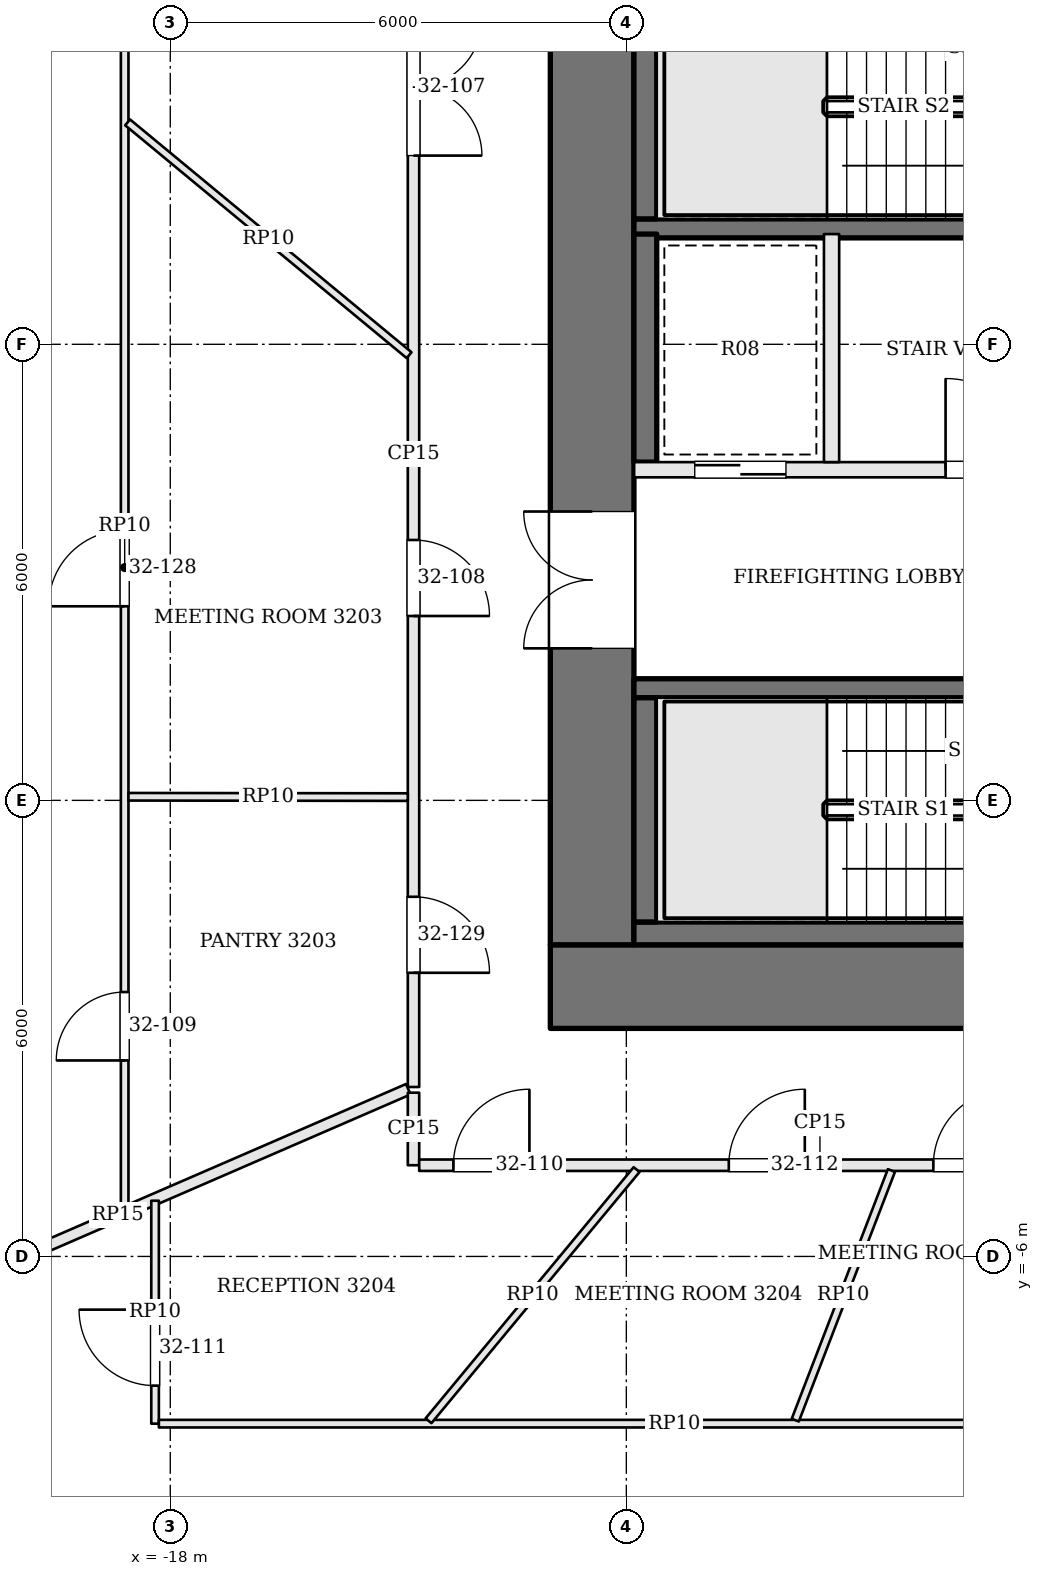
"""IFC4 building model, lengths in metres.
Left out: names, types, materials, properties, quantities, classifications, styles, units other than length and angle.
Written with IfcOpenShell. Run it as: python <this file> out.ifc"""

import sys

from ifc_helpers import new_model, si_unit, direction, frame, frame_2d, origin, place, context, subcontext, project, spatial, rectangle, extrude, element, fill, save


model = new_model("IFC4")
c1 = context("Model", 3, precision=1e-05, world=origin(), true_north=direction((0.0, 1.0)))
c2 = subcontext(c1, "Body", "Model", "MODEL_VIEW")
j1 = project(units=[si_unit("LENGTHUNIT", "METRE"), si_unit("PLANEANGLEUNIT", "RADIAN")], contexts=[c1])
p1 = place(None, origin())
s1 = spatial("IfcSite", under=j1, at=p1, CompositionType="ELEMENT")
p2 = place(p1, origin())
s2 = spatial("IfcBuilding", under=s1, at=p2, CompositionType="ELEMENT")
p3 = place(p2, frame((0.0, 0.0, 134.4)))
s3 = spatial("IfcBuildingStorey", under=s2, at=p3, CompositionType="ELEMENT", Elevation=134.4)
p4 = place(p3, frame((-13.0, -2.45, 0.0), z_axis=(0.0, 0.0, 1.0), x_axis=(1.0, 0.0, 0.0)))
e1 = element("IfcWall", 1, at=p4, inside=s3, PredefinedType="SHEAR", context=c2, shape_type="SweptSolid", body=[
    extrude(rectangle(XDim=26.0, YDim=1.1, at=frame_2d((13.0, 0.0))), origin(), (0.0, 0.0, 1.0), 3.9),
])
p5 = place(p4, frame((9.275, 0.0, 0.0)))
e2 = element("IfcOpeningElement", 2, at=p5, cuts=e1, PredefinedType="OPENING", context=c2, shape_type="SweptSolid", body=[
    extrude(rectangle(XDim=0.9, YDim=2.1, at=frame_2d((0.45, 1.05))), frame((0.0, 0.56, 0.0), z_axis=(0.0, -1.0, 0.0), x_axis=(1.0, 0.0, 0.0)), (0.0, 0.0, 1.0), 1.12),
])
p6 = place(p4, frame((11.75, 0.0, 0.0)))
e3 = element("IfcOpeningElement", 3, at=p6, cuts=e1, PredefinedType="OPENING", context=c2, shape_type="SweptSolid", body=[
    extrude(rectangle(XDim=1.0, YDim=2.1, at=frame_2d((0.5, 1.05))), frame((0.0, 0.56, 0.0), z_axis=(0.0, -1.0, 0.0), x_axis=(1.0, 0.0, 0.0)), (0.0, 0.0, 1.0), 1.12),
])
p7 = place(p4, frame((14.325, 0.0, 0.0)))
e4 = element("IfcOpeningElement", 4, at=p7, cuts=e1, PredefinedType="OPENING", context=c2, shape_type="SweptSolid", body=[
    extrude(rectangle(XDim=0.9, YDim=2.1, at=frame_2d((0.45, 1.05))), frame((0.0, 0.56, 0.0), z_axis=(0.0, -1.0, 0.0), x_axis=(1.0, 0.0, 0.0)), (0.0, 0.0, 1.0), 1.12),
])
p8 = place(p4, frame((16.7, 0.0, 0.0)))
e5 = element("IfcOpeningElement", 5, at=p8, cuts=e1, PredefinedType="OPENING", context=c2, shape_type="SweptSolid", body=[
    extrude(rectangle(XDim=0.9, YDim=2.1, at=frame_2d((0.45, 1.05))), frame((0.0, 0.56, 0.0), z_axis=(0.0, -1.0, 0.0), x_axis=(1.0, 0.0, 0.0)), (0.0, 0.0, 1.0), 1.12),
])
p9 = place(p3, frame((-12.45, -1.9, 0.0), z_axis=(0.0, 0.0, 1.0), x_axis=(0.0, 1.0, 0.0)))
e6 = element("IfcWall", 6, at=p9, inside=s3, PredefinedType="SHEAR", context=c2, shape_type="SweptSolid", body=[
    extrude(rectangle(XDim=12.8, YDim=1.1, at=frame_2d((6.4, 0.0))), origin(), (0.0, 0.0, 1.0), 3.9),
])
p10 = place(p9, frame((3.9, 0.0, 0.0)))
e7 = element("IfcOpeningElement", 7, at=p10, cuts=e6, PredefinedType="OPENING", context=c2, shape_type="SweptSolid", body=[
    extrude(rectangle(XDim=1.8, YDim=2.1, at=frame_2d((0.9, 1.05))), frame((0.0, 0.56, 0.0), z_axis=(0.0, -1.0, 0.0), x_axis=(1.0, 0.0, 0.0)), (0.0, 0.0, 1.0), 1.12),
])
p11 = place(p3, frame((-11.9, 1.475, 0.0), z_axis=(0.0, 0.0, 1.0), x_axis=(1.0, 0.0, 0.0)))
e8 = element("IfcWall", 8, at=p11, inside=s3, PredefinedType="SOLIDWALL", context=c2, shape_type="SweptSolid", body=[
    extrude(rectangle(XDim=6.8, YDim=0.25, at=frame_2d((3.4, 0.0))), origin(), (0.0, 0.0, 1.0), 3.7),
])
p12 = place(p11, frame((5.5, 0.0, 0.0)))
e9 = element("IfcOpeningElement", 9, at=p12, cuts=e8, PredefinedType="OPENING", context=c2, shape_type="SweptSolid", body=[
    extrude(rectangle(XDim=1.2, YDim=2.1, at=frame_2d((0.6, 1.05))), frame((0.0, 0.135, 0.0), z_axis=(0.0, -1.0, 0.0), x_axis=(1.0, 0.0, 0.0)), (0.0, 0.0, 1.0), 0.27),
])
p13 = place(p3, frame((-11.9, 4.35, 0.0), z_axis=(0.0, 0.0, 1.0), x_axis=(1.0, 0.0, 0.0)))
e10 = element("IfcWall", 10, at=p13, inside=s3, PredefinedType="SOLIDWALL", context=c2, shape_type="SweptSolid", body=[
    extrude(rectangle(XDim=6.8, YDim=0.2, at=frame_2d((3.4, 0.0))), origin(), (0.0, 0.0, 1.0), 3.7),
])
p14 = place(p13, frame((4.1, 0.0, 0.0)))
e11 = element("IfcOpeningElement", 11, at=p14, cuts=e10, PredefinedType="OPENING", context=c2, shape_type="SweptSolid", body=[
    extrude(rectangle(XDim=1.2, YDim=2.1, at=frame_2d((0.6, 1.05))), frame((0.0, 0.11, 0.0), z_axis=(0.0, -1.0, 0.0), x_axis=(1.0, 0.0, 0.0)), (0.0, 0.0, 1.0), 0.22),
])
p15 = place(p13, frame((0.8, 0.0, 0.0)))
e12 = element("IfcOpeningElement", 12, at=p15, cuts=e10, PredefinedType="OPENING", context=c2, shape_type="SweptSolid", body=[
    extrude(rectangle(XDim=1.2, YDim=2.1, at=frame_2d((0.6, 1.05))), frame((0.0, 0.11, 0.0), z_axis=(0.0, -1.0, 0.0), x_axis=(1.0, 0.0, 0.0)), (0.0, 0.0, 1.0), 0.22),
])
p16 = place(p3, frame((-11.9, 7.525, 0.0), z_axis=(0.0, 0.0, 1.0), x_axis=(1.0, 0.0, 0.0)))
e13 = element("IfcWall", 13, at=p16, inside=s3, PredefinedType="SOLIDWALL", context=c2, shape_type="SweptSolid", body=[
    extrude(rectangle(XDim=6.8, YDim=0.25, at=frame_2d((3.4, 0.0))), origin(), (0.0, 0.0, 1.0), 3.7),
])
p17 = place(p16, frame((5.5, 0.0, 0.0)))
e14 = element("IfcOpeningElement", 14, at=p17, cuts=e13, PredefinedType="OPENING", context=c2, shape_type="SweptSolid", body=[
    extrude(rectangle(XDim=1.2, YDim=2.1, at=frame_2d((0.6, 1.05))), frame((0.0, 0.135, 0.0), z_axis=(0.0, -1.0, 0.0), x_axis=(1.0, 0.0, 0.0)), (0.0, 0.0, 1.0), 0.27),
])
p18 = place(p3, frame((-9.3, 4.45, 0.0), z_axis=(0.0, 0.0, 1.0), x_axis=(0.0, 1.0, 0.0)))
e15 = element("IfcWall", 15, at=p18, inside=s3, PredefinedType="SOLIDWALL", context=c2, shape_type="SweptSolid", body=[
    extrude(rectangle(XDim=3.0, YDim=0.2, at=frame_2d((1.5, 0.0))), origin(), (0.0, 0.0, 1.0), 3.7),
])
p19 = place(p3, frame((-11.9, -1.75, 0.0), z_axis=(0.0, 0.0, 1.0), x_axis=(1.0, 0.0, 0.0)))
e16 = element("IfcWall", 16, at=p19, inside=s3, PredefinedType="SOLIDWALL", context=c2, shape_type="SweptSolid", body=[
    extrude(rectangle(XDim=6.8, YDim=0.3, at=frame_2d((3.4, 0.0))), origin(), (0.0, 0.0, 1.0), 3.7),
])
p20 = place(p3, frame((-11.75, -1.6, 0.0), z_axis=(0.0, 0.0, 1.0), x_axis=(0.0, 1.0, 0.0)))
e17 = element("IfcWall", 17, at=p20, inside=s3, PredefinedType="SOLIDWALL", context=c2, shape_type="SweptSolid", body=[
    extrude(rectangle(XDim=2.95, YDim=0.3, at=frame_2d((1.475, 0.0))), origin(), (0.0, 0.0, 1.0), 3.7),
])
p21 = place(p3, frame((-11.75, 4.45, 0.0), z_axis=(0.0, 0.0, 1.0), x_axis=(0.0, 1.0, 0.0)))
e18 = element("IfcWall", 18, at=p21, inside=s3, PredefinedType="SOLIDWALL", context=c2, shape_type="SweptSolid", body=[
    extrude(rectangle(XDim=3.0, YDim=0.3, at=frame_2d((1.5, 0.0))), origin(), (0.0, 0.0, 1.0), 3.7),
])
p22 = place(p3, frame((-11.75, 7.65, 0.0), z_axis=(0.0, 0.0, 1.0), x_axis=(0.0, 1.0, 0.0)))
e19 = element("IfcWall", 19, at=p22, inside=s3, PredefinedType="SOLIDWALL", context=c2, shape_type="SweptSolid", body=[
    extrude(rectangle(XDim=2.95, YDim=0.3, at=frame_2d((1.475, 0.0))), origin(), (0.0, 0.0, 1.0), 3.7),
])
p23 = place(p3, frame((-14.8, 12.882, 0.0), z_axis=(0.0, 0.0, 1.0), x_axis=(0.0, -1.0, 0.0)))
e20 = element("IfcWall", 20, at=p23, inside=s3, PredefinedType="PARTITIONING", context=c2, shape_type="SweptSolid", body=[
    extrude(rectangle(XDim=16.652, YDim=0.15, at=frame_2d((8.326, 0.0))), origin(), (0.0, 0.0, 1.0), 3.198),
])
p24 = place(p23, frame((2.599, 0.0, 0.0)))
e21 = element("IfcOpeningElement", 21, at=p24, cuts=e20, PredefinedType="OPENING", context=c2, shape_type="SweptSolid", body=[
    extrude(rectangle(XDim=1.8, YDim=2.1, at=frame_2d((0.9, 1.05))), frame((0.0, 0.085, 0.0), z_axis=(0.0, -1.0, 0.0), x_axis=(1.0, 0.0, 0.0)), (0.0, 0.0, 1.0), 0.17),
])
p25 = place(p23, frame((9.456, 0.0, 0.0)))
e22 = element("IfcOpeningElement", 22, at=p25, cuts=e20, PredefinedType="OPENING", context=c2, shape_type="SweptSolid", body=[
    extrude(rectangle(XDim=1.0, YDim=2.4, at=frame_2d((0.5, 1.2))), frame((0.0, 0.085, 0.0), z_axis=(0.0, -1.0, 0.0), x_axis=(1.0, 0.0, 0.0)), (0.0, 0.0, 1.0), 0.17),
])
p26 = place(p23, frame((14.15, 0.0, 0.0)))
e23 = element("IfcOpeningElement", 23, at=p26, cuts=e20, PredefinedType="OPENING", context=c2, shape_type="SweptSolid", body=[
    extrude(rectangle(XDim=1.0, YDim=2.1, at=frame_2d((0.5, 1.05))), frame((0.0, 0.085, 0.0), z_axis=(0.0, -1.0, 0.0), x_axis=(1.0, 0.0, 0.0)), (0.0, 0.0, 1.0), 0.17),
])
p27 = place(p3, frame((-22.514, -7.116, 0.0), z_axis=(0.0, 0.0, 1.0), x_axis=(0.917457618692, 0.397833530392, 0.0)))
e24 = element("IfcWall", 24, at=p27, inside=s3, PredefinedType="PARTITIONING", context=c2, shape_type="SweptSolid", body=[
    extrude(rectangle(XDim=8.333, YDim=0.15, at=frame_2d((4.167, 0.0))), origin(), (0.0, 0.0, 1.0), 3.198),
])
p28 = place(p3, frame((-14.8, -3.846, 0.0), z_axis=(0.0, 0.0, 1.0), x_axis=(0.0, -1.0, 0.0)))
e25 = element("IfcWall", 25, at=p28, inside=s3, PredefinedType="PARTITIONING", context=c2, shape_type="SweptSolid", body=[
    extrude(rectangle(XDim=0.954, YDim=0.15, at=frame_2d((0.477, 0.0))), origin(), (0.0, 0.0, 1.0), 3.198),
])
p29 = place(p3, frame((-14.725, -4.8, 0.0), z_axis=(0.0, 0.0, 1.0), x_axis=(1.0, 0.0, 0.0)))
e26 = element("IfcWall", 26, at=p29, inside=s3, PredefinedType="PARTITIONING", context=c2, shape_type="SweptSolid", body=[
    extrude(rectangle(XDim=10.544, YDim=0.15, at=frame_2d((5.272, 0.0))), origin(), (0.0, 0.0, 1.0), 3.198),
])
p30 = place(p29, frame((0.45, 0.0, 0.0)))
e27 = element("IfcOpeningElement", 27, at=p30, cuts=e26, PredefinedType="OPENING", context=c2, shape_type="SweptSolid", body=[
    extrude(rectangle(XDim=1.0, YDim=2.1, at=frame_2d((0.5, 1.05))), frame((0.0, 0.085, 0.0), z_axis=(0.0, -1.0, 0.0), x_axis=(1.0, 0.0, 0.0)), (0.0, 0.0, 1.0), 0.17),
])
p31 = place(p29, frame((4.073, 0.0, 0.0)))
e28 = element("IfcOpeningElement", 28, at=p31, cuts=e26, PredefinedType="OPENING", context=c2, shape_type="SweptSolid", body=[
    extrude(rectangle(XDim=1.0, YDim=2.4, at=frame_2d((0.5, 1.2))), frame((0.0, 0.085, 0.0), z_axis=(0.0, -1.0, 0.0), x_axis=(1.0, 0.0, 0.0)), (0.0, 0.0, 1.0), 0.17),
])
p32 = place(p29, frame((6.764, 0.0, 0.0)))
e29 = element("IfcOpeningElement", 29, at=p32, cuts=e26, PredefinedType="OPENING", context=c2, shape_type="SweptSolid", body=[
    extrude(rectangle(XDim=1.0, YDim=2.4, at=frame_2d((0.5, 1.2))), frame((0.0, 0.085, 0.0), z_axis=(0.0, -1.0, 0.0), x_axis=(1.0, 0.0, 0.0)), (0.0, 0.0, 1.0), 0.17),
])
p33 = place(p29, frame((8.916, 0.0, 0.0)))
e30 = element("IfcOpeningElement", 30, at=p33, cuts=e26, PredefinedType="OPENING", context=c2, shape_type="SweptSolid", body=[
    extrude(rectangle(XDim=1.0, YDim=2.4, at=frame_2d((0.5, 1.2))), frame((0.0, 0.085, 0.0), z_axis=(0.0, -1.0, 0.0), x_axis=(1.0, 0.0, 0.0)), (0.0, 0.0, 1.0), 0.17),
])
p34 = place(p3, frame((-18.6, -5.397, 0.0), z_axis=(0.0, 0.0, 1.0), x_axis=(0.0, 1.0, 0.0)))
e31 = element("IfcWall", 31, at=p34, inside=s3, PredefinedType="PARTITIONING", context=c2, shape_type="SweptSolid", body=[
    extrude(rectangle(XDim=16.919, YDim=0.1, at=frame_2d((8.459, 0.0))), origin(), (0.0, 0.0, 1.0), 3.184),
])
p35 = place(p34, frame((1.975, 0.0, 0.0)))
e32 = element("IfcOpeningElement", 32, at=p35, cuts=e31, PredefinedType="OPENING", context=c2, shape_type="SweptSolid", body=[
    extrude(rectangle(XDim=0.9, YDim=2.1, at=frame_2d((0.45, 1.05))), frame((0.0, 0.06, 0.0), z_axis=(0.0, -1.0, 0.0), x_axis=(1.0, 0.0, 0.0)), (0.0, 0.0, 1.0), 0.12),
])
p36 = place(p34, frame((7.95, 0.0, 0.0)))
e33 = element("IfcOpeningElement", 33, at=p36, cuts=e31, PredefinedType="OPENING", context=c2, shape_type="SweptSolid", body=[
    extrude(rectangle(XDim=1.0, YDim=2.4, at=frame_2d((0.5, 1.2))), frame((0.0, 0.06, 0.0), z_axis=(0.0, -1.0, 0.0), x_axis=(1.0, 0.0, 0.0)), (0.0, 0.0, 1.0), 0.12),
])
p37 = place(p3, frame((-14.858, 5.857, 0.0), z_axis=(0.0, 0.0, 1.0), x_axis=(-0.770605931108, 0.637311932213, 0.0)))
e34 = element("IfcWall", 34, at=p37, inside=s3, PredefinedType="PARTITIONING", context=c2, shape_type="SweptSolid", body=[
    extrude(rectangle(XDim=4.806, YDim=0.1, at=frame_2d((2.403, 0.0))), origin(), (0.0, 0.0, 1.0), 3.184),
])
p38 = place(p3, frame((-14.875, 0.043, 0.0), z_axis=(0.0, 0.0, 1.0), x_axis=(-0.999999285062, 0.001195774074, 0.0)))
e35 = element("IfcWall", 35, at=p38, inside=s3, PredefinedType="PARTITIONING", context=c2, shape_type="SweptSolid", body=[
    extrude(rectangle(XDim=3.675, YDim=0.1, at=frame_2d((1.837, 0.0))), origin(), (0.0, 0.0, 1.0), 3.184),
])
p39 = place(p3, frame((-18.2, -8.2, 0.0), z_axis=(0.0, 0.0, 1.0), x_axis=(0.0, 1.0, 0.0)))
e36 = element("IfcWall", 36, at=p39, inside=s3, PredefinedType="PARTITIONING", context=c2, shape_type="SweptSolid", body=[
    extrude(rectangle(XDim=2.933, YDim=0.1, at=frame_2d((1.467, 0.0))), origin(), (0.0, 0.0, 1.0), 3.184),
])
p40 = place(p39, frame((0.5, 0.0, 0.0)))
e37 = element("IfcOpeningElement", 37, at=p40, cuts=e36, PredefinedType="OPENING", context=c2, shape_type="SweptSolid", body=[
    extrude(rectangle(XDim=1.0, YDim=2.1, at=frame_2d((0.5, 1.05))), frame((0.0, 0.06, 0.0), z_axis=(0.0, -1.0, 0.0), x_axis=(1.0, 0.0, 0.0)), (0.0, 0.0, 1.0), 0.12),
])
p41 = place(p3, frame((-4.584, -8.2, 0.0), z_axis=(0.0, 0.0, 1.0), x_axis=(-1.0, 0.0, 0.0)))
e38 = element("IfcWall", 38, at=p41, inside=s3, PredefinedType="PARTITIONING", context=c2, shape_type="SweptSolid", body=[
    extrude(rectangle(XDim=13.566, YDim=0.1, at=frame_2d((6.783, 0.0))), origin(), (0.0, 0.0, 1.0), 3.184),
])
p42 = place(p3, frame((-11.865, -4.858, 0.0), z_axis=(0.0, 0.0, 1.0), x_axis=(-0.638010152626, -0.770027950886, 0.0)))
e39 = element("IfcWall", 39, at=p42, inside=s3, PredefinedType="PARTITIONING", context=c2, shape_type="SweptSolid", body=[
    extrude(rectangle(XDim=4.29, YDim=0.1, at=frame_2d((2.145, 0.0))), origin(), (0.0, 0.0, 1.0), 3.184),
])
p43 = place(p3, frame((-8.513, -4.87, 0.0), z_axis=(0.0, 0.0, 1.0), x_axis=(-0.359444024243, -0.933166648266, 0.0)))
e40 = element("IfcWall", 40, at=p43, inside=s3, PredefinedType="PARTITIONING", context=c2, shape_type="SweptSolid", body=[
    extrude(rectangle(XDim=3.518, YDim=0.1, at=frame_2d((1.759, 0.0))), origin(), (0.0, 0.0, 1.0), 3.184),
])
p44 = place(p10, origin())
e41 = element("IfcDoor", 41, at=p44, inside=s3, OperationType="DOUBLE_DOOR_SINGLE_SWING", PredefinedType="DOOR", context=c2, shape_type="SweptSolid", body=[
    extrude(rectangle(XDim=1.8, YDim=2.1, at=frame_2d((0.9, 1.05))), frame((0.0, 0.025, 0.0), z_axis=(0.0, -1.0, 0.0), x_axis=(1.0, 0.0, 0.0)), (0.0, 0.0, 1.0), 0.05),
])
fill(e7, e41)
p45 = place(p14, origin())
e42 = element("IfcDoor", 42, at=p45, inside=s3, OperationType="SINGLE_SWING_LEFT", PredefinedType="DOOR", context=c2, shape_type="SweptSolid", body=[
    extrude(rectangle(XDim=1.2, YDim=2.1, at=frame_2d((0.6, 1.05))), frame((0.0, 0.025, 0.0), z_axis=(0.0, -1.0, 0.0), x_axis=(1.0, 0.0, 0.0)), (0.0, 0.0, 1.0), 0.05),
])
fill(e11, e42)
p46 = place(p15, origin())
e43 = element("IfcDoor", 43, at=p46, inside=s3, OperationType="SLIDING_TO_RIGHT", PredefinedType="DOOR", context=c2, shape_type="SweptSolid", body=[
    extrude(rectangle(XDim=1.2, YDim=2.1, at=frame_2d((0.6, 1.05))), frame((0.0, 0.025, 0.0), z_axis=(0.0, -1.0, 0.0), x_axis=(1.0, 0.0, 0.0)), (0.0, 0.0, 1.0), 0.05),
])
fill(e12, e43)
p47 = place(p24, origin())
e44 = element("IfcDoor", 44, at=p47, inside=s3, OperationType="DOUBLE_DOOR_SINGLE_SWING", PredefinedType="DOOR", context=c2, shape_type="SweptSolid", body=[
    extrude(rectangle(XDim=1.8, YDim=2.1, at=frame_2d((0.9, 1.05))), frame((0.0, 0.025, 0.0), z_axis=(0.0, -1.0, 0.0), x_axis=(1.0, 0.0, 0.0)), (0.0, 0.0, 1.0), 0.05),
])
fill(e21, e44)
p48 = place(p25, origin())
e45 = element("IfcDoor", 45, at=p48, inside=s3, OperationType="SINGLE_SWING_RIGHT", PredefinedType="DOOR", context=c2, shape_type="SweptSolid", body=[
    extrude(rectangle(XDim=1.0, YDim=2.4, at=frame_2d((0.5, 1.2))), frame((0.0, 0.025, 0.0), z_axis=(0.0, -1.0, 0.0), x_axis=(1.0, 0.0, 0.0)), (0.0, 0.0, 1.0), 0.05),
])
fill(e22, e45)
p49 = place(p35, origin())
e46 = element("IfcDoor", 46, at=p49, inside=s3, OperationType="SINGLE_SWING_LEFT", PredefinedType="DOOR", context=c2, shape_type="SweptSolid", body=[
    extrude(rectangle(XDim=0.9, YDim=2.1, at=frame_2d((0.45, 1.05))), frame((0.0, 0.025, 0.0), z_axis=(0.0, -1.0, 0.0), x_axis=(1.0, 0.0, 0.0)), (0.0, 0.0, 1.0), 0.05),
])
fill(e32, e46)
p50 = place(p30, origin())
e47 = element("IfcDoor", 47, at=p50, inside=s3, OperationType="SINGLE_SWING_RIGHT", PredefinedType="DOOR", context=c2, shape_type="SweptSolid", body=[
    extrude(rectangle(XDim=1.0, YDim=2.1, at=frame_2d((0.5, 1.05))), frame((0.0, 0.025, 0.0), z_axis=(0.0, -1.0, 0.0), x_axis=(1.0, 0.0, 0.0)), (0.0, 0.0, 1.0), 0.05),
])
fill(e27, e47)
p51 = place(p40, origin())
e48 = element("IfcDoor", 48, at=p51, inside=s3, OperationType="SINGLE_SWING_RIGHT", PredefinedType="DOOR", context=c2, shape_type="SweptSolid", body=[
    extrude(rectangle(XDim=1.0, YDim=2.1, at=frame_2d((0.5, 1.05))), frame((0.0, 0.025, 0.0), z_axis=(0.0, -1.0, 0.0), x_axis=(1.0, 0.0, 0.0)), (0.0, 0.0, 1.0), 0.05),
])
fill(e37, e48)
p52 = place(p31, origin())
e49 = element("IfcDoor", 49, at=p52, inside=s3, OperationType="SINGLE_SWING_RIGHT", PredefinedType="DOOR", context=c2, shape_type="SweptSolid", body=[
    extrude(rectangle(XDim=1.0, YDim=2.4, at=frame_2d((0.5, 1.2))), frame((0.0, 0.025, 0.0), z_axis=(0.0, -1.0, 0.0), x_axis=(1.0, 0.0, 0.0)), (0.0, 0.0, 1.0), 0.05),
])
fill(e28, e49)
p53 = place(p32, origin())
e50 = element("IfcDoor", 50, at=p53, inside=s3, OperationType="SINGLE_SWING_RIGHT", PredefinedType="DOOR", context=c2, shape_type="SweptSolid", body=[
    extrude(rectangle(XDim=1.0, YDim=2.4, at=frame_2d((0.5, 1.2))), frame((0.0, 0.025, 0.0), z_axis=(0.0, -1.0, 0.0), x_axis=(1.0, 0.0, 0.0)), (0.0, 0.0, 1.0), 0.05),
])
fill(e29, e50)
p54 = place(p36, origin())
e51 = element("IfcDoor", 51, at=p54, inside=s3, OperationType="SINGLE_SWING_LEFT", PredefinedType="DOOR", context=c2, shape_type="SweptSolid", body=[
    extrude(rectangle(XDim=1.0, YDim=2.4, at=frame_2d((0.5, 1.2))), frame((0.0, 0.025, 0.0), z_axis=(0.0, -1.0, 0.0), x_axis=(1.0, 0.0, 0.0)), (0.0, 0.0, 1.0), 0.05),
])
fill(e33, e51)
p55 = place(p26, origin())
e52 = element("IfcDoor", 52, at=p55, inside=s3, OperationType="SINGLE_SWING_RIGHT", PredefinedType="DOOR", context=c2, shape_type="SweptSolid", body=[
    extrude(rectangle(XDim=1.0, YDim=2.1, at=frame_2d((0.5, 1.05))), frame((0.0, 0.025, 0.0), z_axis=(0.0, -1.0, 0.0), x_axis=(1.0, 0.0, 0.0)), (0.0, 0.0, 1.0), 0.05),
])
fill(e23, e52)
save(model, sys.argv[1])
